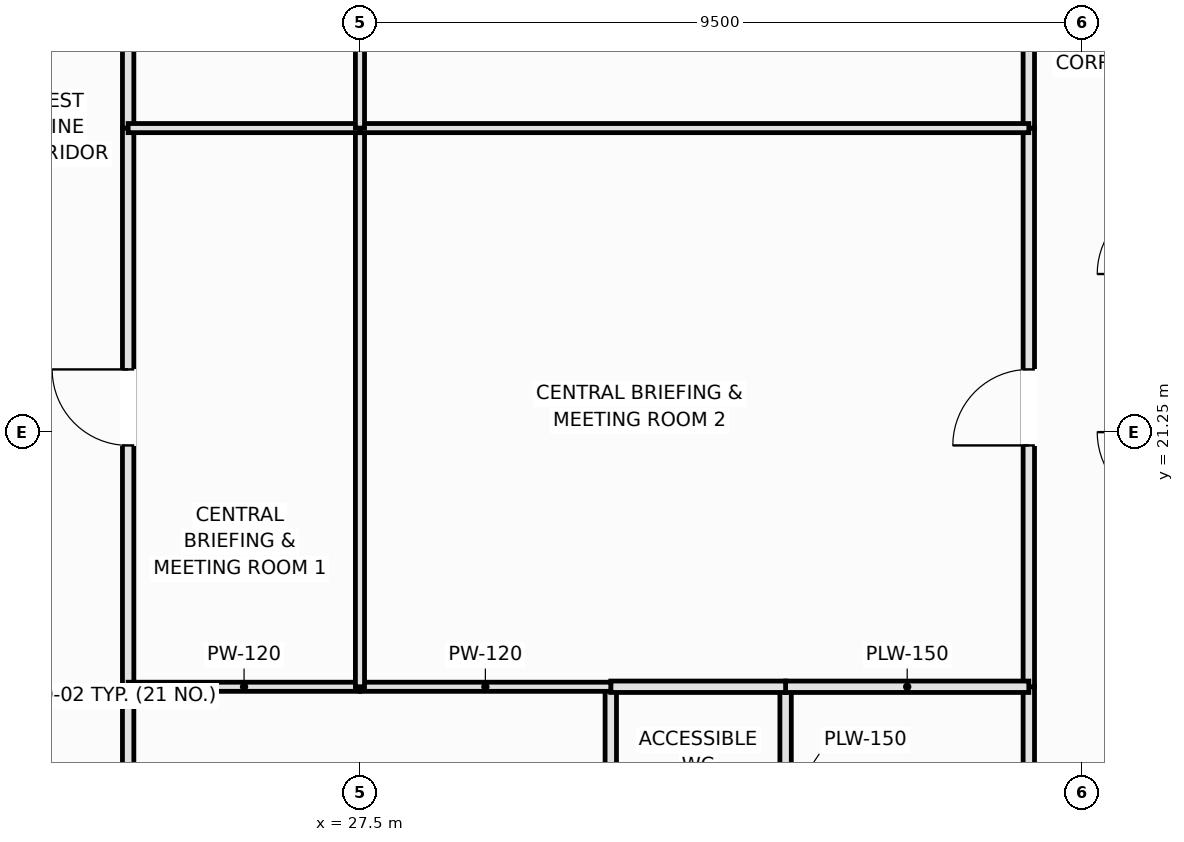
"""IFC4 building model, lengths in metres.
Left out: names, types, materials, properties, quantities, classifications, styles, units other than length and angle.
Written with IfcOpenShell. Run it as: python <this file> out.ifc"""

import sys

from ifc_helpers import new_model, si_unit, direction, frame, frame_2d, origin, place, context, subcontext, project, spatial, rectangle, extrude, element, fill, save


model = new_model("IFC4")
c1 = context("Model", 3, precision=1e-05, world=origin(), true_north=direction((0.0, 1.0)))
c2 = subcontext(c1, "Body", "Model", "MODEL_VIEW")
j1 = project(units=[si_unit("LENGTHUNIT", "METRE"), si_unit("PLANEANGLEUNIT", "RADIAN")], contexts=[c1])
p1 = place(None, origin())
s1 = spatial("IfcSite", under=j1, at=p1, CompositionType="ELEMENT")
p2 = place(p1, origin())
s2 = spatial("IfcBuilding", under=s1, at=p2, CompositionType="ELEMENT")
p3 = place(p2, frame((0.0, 0.0, 82.4)))
s3 = spatial("IfcBuildingStorey", under=s2, at=p3, CompositionType="ELEMENT", Elevation=82.4)
p4 = place(p3, frame((24.45, 14.8, 0.0), z_axis=(0.0, 0.0, 1.0), x_axis=(0.0, 1.0, 0.0)))
e1 = element("IfcWall", 1, at=p4, inside=s3, PredefinedType="PARTITIONING", context=c2, shape_type="SweptSolid", body=[
    extrude(rectangle(XDim=3.1, YDim=0.15, at=frame_2d((1.55, 0.0))), origin(), (0.0, 0.0, 1.0), 3.37),
])
p5 = place(p4, frame((1.05, 0.0, 0.0)))
e2 = element("IfcOpeningElement", 2, at=p5, cuts=e1, PredefinedType="OPENING", context=c2, shape_type="SweptSolid", body=[
    extrude(rectangle(XDim=1.0, YDim=2.15, at=frame_2d((0.5, 1.075))), frame((0.0, 0.085, 0.0), z_axis=(0.0, -1.0, 0.0), x_axis=(1.0, 0.0, 0.0)), (0.0, 0.0, 1.0), 0.17),
])
p6 = place(p3, frame((24.45, 17.9, 0.0), z_axis=(0.0, 0.0, 1.0), x_axis=(0.0, 1.0, 0.0)))
e3 = element("IfcWall", 3, at=p6, inside=s3, PredefinedType="PARTITIONING", context=c2, shape_type="SweptSolid", body=[
    extrude(rectangle(XDim=7.35, YDim=0.15, at=frame_2d((3.675, 0.0))), origin(), (0.0, 0.0, 1.0), 3.37),
])
p7 = place(p6, frame((3.175, 0.0, 0.0)))
e4 = element("IfcOpeningElement", 4, at=p7, cuts=e3, PredefinedType="OPENING", context=c2, shape_type="SweptSolid", body=[
    extrude(rectangle(XDim=1.0, YDim=2.15, at=frame_2d((0.5, 1.075))), frame((0.0, 0.085, 0.0), z_axis=(0.0, -1.0, 0.0), x_axis=(1.0, 0.0, 0.0)), (0.0, 0.0, 1.0), 0.17),
])
p8 = place(p3, frame((24.45, 25.25, 0.0), z_axis=(0.0, 0.0, 1.0), x_axis=(0.0, 1.0, 0.0)))
e5 = element("IfcWall", 5, at=p8, inside=s3, PredefinedType="PARTITIONING", context=c2, shape_type="SweptSolid", body=[
    extrude(rectangle(XDim=6.05, YDim=0.15, at=frame_2d((3.025, 0.0))), origin(), (0.0, 0.0, 1.0), 3.37),
])
p9 = place(p8, frame((2.525, 0.0, 0.0)))
e6 = element("IfcOpeningElement", 6, at=p9, cuts=e5, PredefinedType="OPENING", context=c2, shape_type="SweptSolid", body=[
    extrude(rectangle(XDim=1.0, YDim=2.15, at=frame_2d((0.5, 1.075))), frame((0.0, 0.085, 0.0), z_axis=(0.0, -1.0, 0.0), x_axis=(1.0, 0.0, 0.0)), (0.0, 0.0, 1.0), 0.17),
])
p10 = place(p3, frame((36.3, 14.8, 0.0), z_axis=(0.0, 0.0, 1.0), x_axis=(0.0, 1.0, 0.0)))
e7 = element("IfcWall", 7, at=p10, inside=s3, PredefinedType="PLUMBINGWALL", context=c2, shape_type="SweptSolid", body=[
    extrude(rectangle(XDim=3.1, YDim=0.15, at=frame_2d((1.55, 0.0))), origin(), (0.0, 0.0, 1.0), 3.37),
])
p11 = place(p10, frame((1.1, 0.0, 0.0)))
e8 = element("IfcOpeningElement", 8, at=p11, cuts=e7, PredefinedType="OPENING", context=c2, shape_type="SweptSolid", body=[
    extrude(rectangle(XDim=0.9, YDim=2.1, at=frame_2d((0.45, 1.05))), frame((0.0, 0.085, 0.0), z_axis=(0.0, -1.0, 0.0), x_axis=(1.0, 0.0, 0.0)), (0.0, 0.0, 1.0), 0.17),
])
p12 = place(p3, frame((36.3, 17.9, 0.0), z_axis=(0.0, 0.0, 1.0), x_axis=(0.0, 1.0, 0.0)))
e9 = element("IfcWall", 9, at=p12, inside=s3, PredefinedType="PARTITIONING", context=c2, shape_type="SweptSolid", body=[
    extrude(rectangle(XDim=7.35, YDim=0.15, at=frame_2d((3.675, 0.0))), origin(), (0.0, 0.0, 1.0), 3.37),
])
p13 = place(p12, frame((3.175, 0.0, 0.0)))
e10 = element("IfcOpeningElement", 10, at=p13, cuts=e9, PredefinedType="OPENING", context=c2, shape_type="SweptSolid", body=[
    extrude(rectangle(XDim=1.0, YDim=2.15, at=frame_2d((0.5, 1.075))), frame((0.0, 0.085, 0.0), z_axis=(0.0, -1.0, 0.0), x_axis=(1.0, 0.0, 0.0)), (0.0, 0.0, 1.0), 0.17),
])
p14 = place(p3, frame((36.3, 25.25, 0.0), z_axis=(0.0, 0.0, 1.0), x_axis=(0.0, 1.0, 0.0)))
e11 = element("IfcWall", 11, at=p14, inside=s3, PredefinedType="PARTITIONING", context=c2, shape_type="SweptSolid", body=[
    extrude(rectangle(XDim=6.05, YDim=0.15, at=frame_2d((3.025, 0.0))), origin(), (0.0, 0.0, 1.0), 3.37),
])
p15 = place(p14, frame((2.525, 0.0, 0.0)))
e12 = element("IfcOpeningElement", 12, at=p15, cuts=e11, PredefinedType="OPENING", context=c2, shape_type="SweptSolid", body=[
    extrude(rectangle(XDim=1.0, YDim=2.15, at=frame_2d((0.5, 1.075))), frame((0.0, 0.085, 0.0), z_axis=(0.0, -1.0, 0.0), x_axis=(1.0, 0.0, 0.0)), (0.0, 0.0, 1.0), 0.17),
])
p16 = place(p3, frame((33.1, 14.8, 0.0), z_axis=(0.0, 0.0, 1.0), x_axis=(0.0, 1.0, 0.0)))
e13 = element("IfcWall", 13, at=p16, inside=s3, PredefinedType="PLUMBINGWALL", context=c2, shape_type="SweptSolid", body=[
    extrude(rectangle(XDim=3.1, YDim=0.15, at=frame_2d((1.55, 0.0))), origin(), (0.0, 0.0, 1.0), 3.37),
])
p17 = place(p3, frame((33.1, 17.9, 0.0), z_axis=(0.0, 0.0, 1.0), x_axis=(1.0, 0.0, 0.0)))
e14 = element("IfcWall", 14, at=p17, inside=s3, PredefinedType="PLUMBINGWALL", context=c2, shape_type="SweptSolid", body=[
    extrude(rectangle(XDim=3.2, YDim=0.15, at=frame_2d((1.6, 0.0))), origin(), (0.0, 0.0, 1.0), 3.37),
])
p18 = place(p3, frame((30.8, 14.8, 0.0), z_axis=(0.0, 0.0, 1.0), x_axis=(0.0, 1.0, 0.0)))
e15 = element("IfcWall", 15, at=p18, inside=s3, PredefinedType="PLUMBINGWALL", context=c2, shape_type="SweptSolid", body=[
    extrude(rectangle(XDim=3.1, YDim=0.15, at=frame_2d((1.55, 0.0))), origin(), (0.0, 0.0, 1.0), 3.37),
])
p19 = place(p3, frame((30.8, 17.9, 0.0), z_axis=(0.0, 0.0, 1.0), x_axis=(1.0, 0.0, 0.0)))
e16 = element("IfcWall", 16, at=p19, inside=s3, PredefinedType="PLUMBINGWALL", context=c2, shape_type="SweptSolid", body=[
    extrude(rectangle(XDim=2.3, YDim=0.15, at=frame_2d((1.15, 0.0))), origin(), (0.0, 0.0, 1.0), 3.37),
])
p20 = place(p3, frame((24.45, 17.9, 0.0), z_axis=(0.0, 0.0, 1.0), x_axis=(1.0, 0.0, 0.0)))
e17 = element("IfcWall", 17, at=p20, inside=s3, PredefinedType="PARTITIONING", context=c2, shape_type="SweptSolid", body=[
    extrude(rectangle(XDim=3.05, YDim=0.12, at=frame_2d((1.525, 0.0))), origin(), (0.0, 0.0, 1.0), 3.37),
])
p21 = place(p3, frame((27.5, 17.9, 0.0), z_axis=(0.0, 0.0, 1.0), x_axis=(1.0, 0.0, 0.0)))
e18 = element("IfcWall", 18, at=p21, inside=s3, PredefinedType="PARTITIONING", context=c2, shape_type="SweptSolid", body=[
    extrude(rectangle(XDim=3.3, YDim=0.12, at=frame_2d((1.65, 0.0))), origin(), (0.0, 0.0, 1.0), 3.37),
])
p22 = place(p3, frame((27.5, 17.9, 0.0), z_axis=(0.0, 0.0, 1.0), x_axis=(0.0, 1.0, 0.0)))
e19 = element("IfcWall", 19, at=p22, inside=s3, PredefinedType="PARTITIONING", context=c2, shape_type="SweptSolid", body=[
    extrude(rectangle(XDim=7.35, YDim=0.12, at=frame_2d((3.675, 0.0))), origin(), (0.0, 0.0, 1.0), 3.37),
])
p23 = place(p3, frame((24.45, 25.25, 0.0), z_axis=(0.0, 0.0, 1.0), x_axis=(1.0, 0.0, 0.0)))
e20 = element("IfcWall", 20, at=p23, inside=s3, PredefinedType="PARTITIONING", context=c2, shape_type="SweptSolid", body=[
    extrude(rectangle(XDim=3.05, YDim=0.12, at=frame_2d((1.525, 0.0))), origin(), (0.0, 0.0, 1.0), 2.72),
])
p24 = place(p3, frame((27.5, 25.25, 0.0), z_axis=(0.0, 0.0, 1.0), x_axis=(1.0, 0.0, 0.0)))
e21 = element("IfcWall", 21, at=p24, inside=s3, PredefinedType="PARTITIONING", context=c2, shape_type="SweptSolid", body=[
    extrude(rectangle(XDim=8.8, YDim=0.12, at=frame_2d((4.4, 0.0))), origin(), (0.0, 0.0, 1.0), 2.72),
])
p25 = place(p3, frame((27.5, 25.25, 0.0), z_axis=(0.0, 0.0, 1.0), x_axis=(0.0, 1.0, 0.0)))
e22 = element("IfcWall", 22, at=p25, inside=s3, PredefinedType="PARTITIONING", context=c2, shape_type="SweptSolid", body=[
    extrude(rectangle(XDim=6.05, YDim=0.12, at=frame_2d((3.025, 0.0))), origin(), (0.0, 0.0, 1.0), 3.37),
])
p26 = place(p7, origin())
e23 = element("IfcDoor", 23, at=p26, inside=s3, OperationType="SINGLE_SWING_RIGHT", PredefinedType="DOOR", context=c2, shape_type="SweptSolid", body=[
    extrude(rectangle(XDim=1.0, YDim=2.15, at=frame_2d((0.5, 1.075))), frame((0.0, 0.025, 0.0), z_axis=(0.0, -1.0, 0.0), x_axis=(1.0, 0.0, 0.0)), (0.0, 0.0, 1.0), 0.05),
])
fill(e4, e23)
p27 = place(p13, origin())
e24 = element("IfcDoor", 24, at=p27, inside=s3, OperationType="SINGLE_SWING_LEFT", PredefinedType="DOOR", context=c2, shape_type="SweptSolid", body=[
    extrude(rectangle(XDim=1.0, YDim=2.15, at=frame_2d((0.5, 1.075))), frame((0.0, 0.025, 0.0), z_axis=(0.0, -1.0, 0.0), x_axis=(1.0, 0.0, 0.0)), (0.0, 0.0, 1.0), 0.05),
])
fill(e10, e24)
save(model, sys.argv[1])
